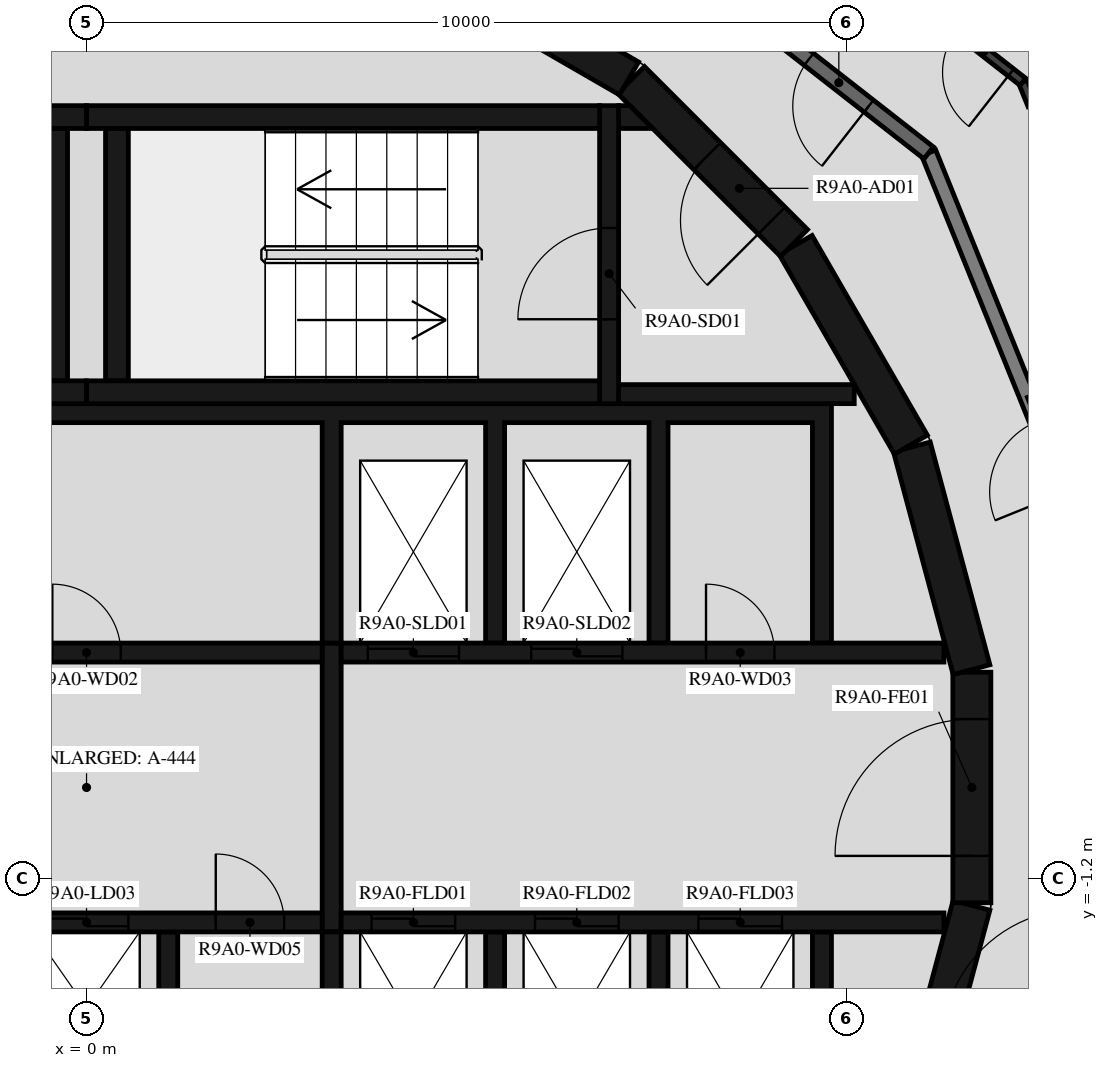
"""IFC4 building model, lengths in metres.
Left out: names, types, materials, properties, quantities, classifications, styles, units other than length and angle.
Written with IfcOpenShell. Run it as: python <this file> out.ifc"""

import sys

from ifc_helpers import new_model, si_unit, direction, frame, frame_2d, origin, place, context, subcontext, project, spatial, polyline, rectangle, outline, extrude, element, fill, save


model = new_model("IFC4")
c1 = context("Model", 3, precision=1e-05, world=origin(), true_north=direction((0.0, 1.0)))
c2 = subcontext(c1, "Body", "Model", "MODEL_VIEW")
j1 = project(units=[si_unit("LENGTHUNIT", "METRE"), si_unit("PLANEANGLEUNIT", "RADIAN")], contexts=[c1])
p1 = place(None, origin())
s1 = spatial("IfcSite", under=j1, at=p1, CompositionType="ELEMENT")
p2 = place(p1, origin())
s2 = spatial("IfcBuilding", under=s1, at=p2, CompositionType="ELEMENT")
p3 = place(p2, frame((0.0, 0.0, 333.0)))
s3 = spatial("IfcBuildingStorey", under=s2, at=p3, CompositionType="ELEMENT", Elevation=333.0)
p4 = place(p3, frame((10.858, -4.479, 0.0), z_axis=(0.0, 0.0, 1.0), x_axis=(0.258734743916, 0.965948410781, 0.0)))
e1 = element("IfcWall", 1, at=p4, inside=s3, PredefinedType="SHEAR", context=c2, shape_type="SweptSolid", body=[
    extrude(rectangle(XDim=3.033, YDim=0.5, at=frame_2d((1.516, 0.0))), origin(), (0.0, 0.0, 1.0), 3.12),
])
p5 = place(p3, frame((11.647, -1.516, 0.0), z_axis=(0.0, 0.0, 1.0), x_axis=(0.0, 1.0, 0.0)))
e2 = element("IfcWall", 2, at=p5, inside=s3, PredefinedType="SHEAR", context=c2, shape_type="SweptSolid", body=[
    extrude(rectangle(XDim=3.033, YDim=0.5, at=frame_2d((1.516, 0.0))), origin(), (0.0, 0.0, 1.0), 3.12),
])
p6 = place(p5, frame((0.616, 0.0, 0.0)))
e3 = element("IfcOpeningElement", 3, at=p6, cuts=e2, PredefinedType="OPENING", context=c2, shape_type="SweptSolid", body=[
    extrude(rectangle(XDim=1.8, YDim=2.1, at=frame_2d((0.9, 1.05))), frame((0.0, 0.26, 0.0), z_axis=(0.0, -1.0, 0.0), x_axis=(1.0, 0.0, 0.0)), (0.0, 0.0, 1.0), 0.52),
])
for number, where, z_axis, x_axis in (
    (4, (11.643, 1.55, 0.0), (0.0, 0.0, 1.0), (-0.259, 0.966, 0.0)),
    (5, (10.845, 4.51, 0.0), (0.0, 0.0, 1.0), (-0.5, 0.866, 0.0)),
):
    element("IfcWall", number, at=place(p3, frame(where, z_axis=z_axis, x_axis=x_axis)), inside=s3, PredefinedType="SHEAR", context=c2, shape_type="SweptSolid", body=[
        extrude(rectangle(XDim=3.033, YDim=0.5, at=frame_2d((1.516, 0.0))), origin(), (0.0, 0.0, 1.0), 3.12),
    ])
p7 = place(p3, frame((9.308, 7.164, 0.0), z_axis=(0.0, 0.0, 1.0), x_axis=(-0.707106781187, 0.707106781187, 0.0)))
e6 = element("IfcWall", 6, at=p7, inside=s3, PredefinedType="SHEAR", context=c2, shape_type="SweptSolid", body=[
    extrude(rectangle(XDim=3.032, YDim=0.5, at=frame_2d((1.516, 0.0))), origin(), (0.0, 0.0, 1.0), 3.12),
])
p8 = place(p7, frame((0.416, 0.0, 0.0)))
e7 = element("IfcOpeningElement", 7, at=p8, cuts=e6, PredefinedType="OPENING", context=c2, shape_type="SweptSolid", body=[
    extrude(rectangle(XDim=1.2, YDim=2.1, at=frame_2d((0.6, 1.05))), frame((0.0, 0.26, 0.0), z_axis=(0.0, -1.0, 0.0), x_axis=(1.0, 0.0, 0.0)), (0.0, 0.0, 1.0), 0.52),
])
p9 = place(p3, frame((7.137, 9.329, 0.0), z_axis=(0.0, 0.0, 1.0), x_axis=(-0.865975092491, 0.500087131594, 0.0)))
e8 = element("IfcWall", 8, at=p9, inside=s3, PredefinedType="SHEAR", context=c2, shape_type="SweptSolid", body=[
    extrude(rectangle(XDim=3.033, YDim=0.5, at=frame_2d((1.516, 0.0))), origin(), (0.0, 0.0, 1.0), 3.12),
])
for number, where, z_axis, x_axis in (
    (9, (0.0, 5.2, 0.0), (0.0, 0.0, 1.0), (1.0, 0.0, 0.0)),
    (10, (0.0, 8.82, 0.0), (0.0, 0.0, 1.0), (1.0, 0.0, 0.0)),
):
    element("IfcWall", number, at=place(p3, frame(where, z_axis=z_axis, x_axis=x_axis)), inside=s3, PredefinedType="SHEAR", context=c2, shape_type="SweptSolid", body=[
        extrude(rectangle(XDim=6.75, YDim=0.3, at=frame_2d((3.375, 0.0))), origin(), (0.0, 0.0, 1.0), 3.12),
    ])
p10 = place(p3, frame((0.4, 5.35, 0.0), z_axis=(0.0, 0.0, 1.0), x_axis=(0.0, 1.0, 0.0)))
e11 = element("IfcWall", 11, at=p10, inside=s3, PredefinedType="SHEAR", context=c2, shape_type="SweptSolid", body=[
    extrude(rectangle(XDim=3.32, YDim=0.3, at=frame_2d((1.66, 0.0))), origin(), (0.0, 0.0, 1.0), 3.12),
])
p11 = place(p3, frame((6.875, 5.05, 0.0), z_axis=(0.0, 0.0, 1.0), x_axis=(0.0, 1.0, 0.0)))
e12 = element("IfcWall", 12, at=p11, inside=s3, PredefinedType="SHEAR", context=c2, shape_type="SweptSolid", body=[
    extrude(rectangle(XDim=3.92, YDim=0.25, at=frame_2d((1.96, 0.0))), origin(), (0.0, 0.0, 1.0), 3.12),
])
p12 = place(p11, frame((1.11, 0.0, 0.0)))
e13 = element("IfcOpeningElement", 13, at=p12, cuts=e12, PredefinedType="OPENING", context=c2, shape_type="SweptSolid", body=[
    extrude(rectangle(XDim=1.2, YDim=2.1, at=frame_2d((0.6, 1.05))), frame((0.0, 0.135, 0.0), z_axis=(0.0, -1.0, 0.0), x_axis=(1.0, 0.0, 0.0)), (0.0, 0.0, 1.0), 0.27),
])
p13 = place(p3, frame((7.0, 5.175, 0.0), z_axis=(0.0, 0.0, 1.0), x_axis=(1.0, 0.0, 0.0)))
e14 = element("IfcWall", 14, at=p13, inside=s3, PredefinedType="SHEAR", context=c2, shape_type="SweptSolid", body=[
    extrude(rectangle(XDim=3.1, YDim=0.25, at=frame_2d((1.55, 0.0))), origin(), (0.0, 0.0, 1.0), 3.12),
])
p14 = place(p3, origin())
e15 = element("IfcWall", 15, at=p14, inside=s3, PredefinedType="SHEAR", context=c2, shape_type="SweptSolid", body=[
    extrude(outline(polyline([(7.448, 8.67), (7.0, 8.67), (7.0, 8.97), (7.148, 8.97), (7.448, 8.67)])), origin(), (0.0, 0.0, 1.0), 3.12),
])
for number, where, z_axis, x_axis in (
    (16, (-6.75, 5.2, 0.0), (0.0, 0.0, 1.0), (1.0, 0.0, 0.0)),
    (17, (-6.75, 8.82, 0.0), (0.0, 0.0, 1.0), (1.0, 0.0, 0.0)),
):
    element("IfcWall", number, at=place(p3, frame(where, z_axis=z_axis, x_axis=x_axis)), inside=s3, PredefinedType="SHEAR", context=c2, shape_type="SweptSolid", body=[
        extrude(rectangle(XDim=6.75, YDim=0.3, at=frame_2d((3.375, 0.0))), origin(), (0.0, 0.0, 1.0), 3.12),
    ])
p15 = place(p3, frame((-0.4, 5.35, 0.0), z_axis=(0.0, 0.0, 1.0), x_axis=(0.0, 1.0, 0.0)))
e18 = element("IfcWall", 18, at=p15, inside=s3, PredefinedType="SHEAR", context=c2, shape_type="SweptSolid", body=[
    extrude(rectangle(XDim=3.32, YDim=0.3, at=frame_2d((1.66, 0.0))), origin(), (0.0, 0.0, 1.0), 3.12),
])
p16 = place(p3, origin())
e19 = element("IfcWall", 19, at=p16, inside=s3, PredefinedType="SHEAR", context=c2, shape_type="SweptSolid", body=[
    extrude(outline(polyline([(-9.8, 1.9), (-9.55, 1.9), (-9.55, 4.8), (-3.35, 4.8), (-3.35, 1.9), (-3.1, 1.9), (-3.1, 4.8), (3.1, 4.8), (3.1, 1.9), (3.35, 1.9), (3.35, 4.8), (5.25, 4.8), (5.25, 1.9), (5.5, 1.9), (5.5, 4.8), (7.4, 4.8), (7.4, 1.9), (7.65, 1.9), (7.65, 4.8), (9.55, 4.8), (9.55, 1.9), (9.8, 1.9), (9.8, 4.8), (9.8, 5.05), (-9.8, 5.05), (-9.8, 4.8), (-9.8, 1.9)])), origin(), (0.0, 0.0, 1.0), 3.12),
])
p17 = place(p3, origin())
e20 = element("IfcWall", 20, at=p17, inside=s3, PredefinedType="SHEAR", context=c2, shape_type="SweptSolid", body=[
    extrude(outline(polyline([(9.8, -5.05), (9.8, -4.8), (9.8, -1.9), (9.55, -1.9), (9.55, -4.8), (7.65, -4.8), (7.65, -1.9), (7.4, -1.9), (7.4, -4.8), (5.5, -4.8), (5.5, -1.9), (5.25, -1.9), (5.25, -4.8), (3.35, -4.8), (3.35, -1.9), (3.1, -1.9), (3.1, -4.8), (1.2, -4.8), (1.2, -1.9), (0.95, -1.9), (0.95, -4.8), (-0.95, -4.8), (-0.95, -1.9), (-1.2, -1.9), (-1.2, -4.8), (-3.1, -4.8), (-3.1, -1.9), (-3.35, -1.9), (-3.35, -4.8), (-5.25, -4.8), (-5.25, -1.9), (-5.5, -1.9), (-5.5, -4.8), (-9.55, -4.8), (-9.55, -1.9), (-9.8, -1.9), (-9.8, -4.8), (-9.8, -5.05), (9.8, -5.05)])), origin(), (0.0, 0.0, 1.0), 3.12),
])
p18 = place(p3, frame((-11.28, 1.775, 0.0), z_axis=(0.0, 0.0, 1.0), x_axis=(1.0, 0.0, 0.0)))
e21 = element("IfcWall", 21, at=p18, inside=s3, PredefinedType="SHEAR", context=c2, shape_type="SweptSolid", body=[
    extrude(rectangle(XDim=14.38, YDim=0.25, at=frame_2d((7.19, 0.0))), origin(), (0.0, 0.0, 1.0), 3.12),
])
p19 = place(p18, frame((4.38, 0.0, 0.0)))
e22 = element("IfcOpeningElement", 22, at=p19, cuts=e21, PredefinedType="OPENING", context=c2, shape_type="SweptSolid", body=[
    extrude(rectangle(XDim=0.9, YDim=2.1, at=frame_2d((0.45, 1.05))), frame((0.0, 0.135, 0.0), z_axis=(0.0, -1.0, 0.0), x_axis=(1.0, 0.0, 0.0)), (0.0, 0.0, 1.0), 0.27),
])
p20 = place(p18, frame((10.83, 0.0, 0.0)))
e23 = element("IfcOpeningElement", 23, at=p20, cuts=e21, PredefinedType="OPENING", context=c2, shape_type="SweptSolid", body=[
    extrude(rectangle(XDim=0.9, YDim=2.1, at=frame_2d((0.45, 1.05))), frame((0.0, 0.135, 0.0), z_axis=(0.0, -1.0, 0.0), x_axis=(1.0, 0.0, 0.0)), (0.0, 0.0, 1.0), 0.27),
])
p21 = place(p3, frame((3.35, 1.775, 0.0), z_axis=(0.0, 0.0, 1.0), x_axis=(1.0, 0.0, 0.0)))
e24 = element("IfcWall", 24, at=p21, inside=s3, PredefinedType="SHEAR", context=c2, shape_type="SweptSolid", body=[
    extrude(rectangle(XDim=7.93, YDim=0.25, at=frame_2d((3.965, 0.0))), origin(), (0.0, 0.0, 1.0), 3.12),
])
p22 = place(p21, frame((0.35, 0.0, 0.0)))
e25 = element("IfcOpeningElement", 25, at=p22, cuts=e24, PredefinedType="OPENING", context=c2, shape_type="SweptSolid", body=[
    extrude(rectangle(XDim=1.2, YDim=2.4, at=frame_2d((0.6, 1.2))), frame((0.0, 0.135, 0.0), z_axis=(0.0, -1.0, 0.0), x_axis=(1.0, 0.0, 0.0)), (0.0, 0.0, 1.0), 0.27),
])
p23 = place(p21, frame((2.5, 0.0, 0.0)))
e26 = element("IfcOpeningElement", 26, at=p23, cuts=e24, PredefinedType="OPENING", context=c2, shape_type="SweptSolid", body=[
    extrude(rectangle(XDim=1.2, YDim=2.4, at=frame_2d((0.6, 1.2))), frame((0.0, 0.135, 0.0), z_axis=(0.0, -1.0, 0.0), x_axis=(1.0, 0.0, 0.0)), (0.0, 0.0, 1.0), 0.27),
])
p24 = place(p21, frame((4.8, 0.0, 0.0)))
e27 = element("IfcOpeningElement", 27, at=p24, cuts=e24, PredefinedType="OPENING", context=c2, shape_type="SweptSolid", body=[
    extrude(rectangle(XDim=0.9, YDim=2.1, at=frame_2d((0.45, 1.05))), frame((0.0, 0.135, 0.0), z_axis=(0.0, -1.0, 0.0), x_axis=(1.0, 0.0, 0.0)), (0.0, 0.0, 1.0), 0.27),
])
p25 = place(p3, frame((-11.28, -1.775, 0.0), z_axis=(0.0, 0.0, 1.0), x_axis=(1.0, 0.0, 0.0)))
e28 = element("IfcWall", 28, at=p25, inside=s3, PredefinedType="SHEAR", context=c2, shape_type="SweptSolid", body=[
    extrude(rectangle(XDim=14.38, YDim=0.25, at=frame_2d((7.19, 0.0))), origin(), (0.0, 0.0, 1.0), 3.12),
])
p26 = place(p25, frame((6.43, 0.0, 0.0)))
e29 = element("IfcOpeningElement", 29, at=p26, cuts=e28, PredefinedType="OPENING", context=c2, shape_type="SweptSolid", body=[
    extrude(rectangle(XDim=1.1, YDim=2.1, at=frame_2d((0.55, 1.05))), frame((0.0, 0.135, 0.0), z_axis=(0.0, -1.0, 0.0), x_axis=(1.0, 0.0, 0.0)), (0.0, 0.0, 1.0), 0.27),
])
p27 = place(p25, frame((8.58, 0.0, 0.0)))
e30 = element("IfcOpeningElement", 30, at=p27, cuts=e28, PredefinedType="OPENING", context=c2, shape_type="SweptSolid", body=[
    extrude(rectangle(XDim=1.1, YDim=2.1, at=frame_2d((0.55, 1.05))), frame((0.0, 0.135, 0.0), z_axis=(0.0, -1.0, 0.0), x_axis=(1.0, 0.0, 0.0)), (0.0, 0.0, 1.0), 0.27),
])
p28 = place(p25, frame((10.73, 0.0, 0.0)))
e31 = element("IfcOpeningElement", 31, at=p28, cuts=e28, PredefinedType="OPENING", context=c2, shape_type="SweptSolid", body=[
    extrude(rectangle(XDim=1.1, YDim=2.1, at=frame_2d((0.55, 1.05))), frame((0.0, 0.135, 0.0), z_axis=(0.0, -1.0, 0.0), x_axis=(1.0, 0.0, 0.0)), (0.0, 0.0, 1.0), 0.27),
])
p29 = place(p25, frame((3.305, 0.0, 0.0)))
e32 = element("IfcOpeningElement", 32, at=p29, cuts=e28, PredefinedType="OPENING", context=c2, shape_type="SweptSolid", body=[
    extrude(rectangle(XDim=0.9, YDim=2.1, at=frame_2d((0.45, 1.05))), frame((0.0, 0.135, 0.0), z_axis=(0.0, -1.0, 0.0), x_axis=(1.0, 0.0, 0.0)), (0.0, 0.0, 1.0), 0.27),
])
p30 = place(p25, frame((12.98, 0.0, 0.0)))
e33 = element("IfcOpeningElement", 33, at=p30, cuts=e28, PredefinedType="OPENING", context=c2, shape_type="SweptSolid", body=[
    extrude(rectangle(XDim=0.9, YDim=2.1, at=frame_2d((0.45, 1.05))), frame((0.0, 0.135, 0.0), z_axis=(0.0, -1.0, 0.0), x_axis=(1.0, 0.0, 0.0)), (0.0, 0.0, 1.0), 0.27),
])
p31 = place(p3, frame((3.35, -1.775, 0.0), z_axis=(0.0, 0.0, 1.0), x_axis=(1.0, 0.0, 0.0)))
e34 = element("IfcWall", 34, at=p31, inside=s3, PredefinedType="SHEAR", context=c2, shape_type="SweptSolid", body=[
    extrude(rectangle(XDim=7.93, YDim=0.25, at=frame_2d((3.965, 0.0))), origin(), (0.0, 0.0, 1.0), 3.12),
])
p32 = place(p31, frame((0.4, 0.0, 0.0)))
e35 = element("IfcOpeningElement", 35, at=p32, cuts=e34, PredefinedType="OPENING", context=c2, shape_type="SweptSolid", body=[
    extrude(rectangle(XDim=1.1, YDim=2.4, at=frame_2d((0.55, 1.2))), frame((0.0, 0.135, 0.0), z_axis=(0.0, -1.0, 0.0), x_axis=(1.0, 0.0, 0.0)), (0.0, 0.0, 1.0), 0.27),
])
p33 = place(p31, frame((2.55, 0.0, 0.0)))
e36 = element("IfcOpeningElement", 36, at=p33, cuts=e34, PredefinedType="OPENING", context=c2, shape_type="SweptSolid", body=[
    extrude(rectangle(XDim=1.1, YDim=2.4, at=frame_2d((0.55, 1.2))), frame((0.0, 0.135, 0.0), z_axis=(0.0, -1.0, 0.0), x_axis=(1.0, 0.0, 0.0)), (0.0, 0.0, 1.0), 0.27),
])
p34 = place(p31, frame((4.7, 0.0, 0.0)))
e37 = element("IfcOpeningElement", 37, at=p34, cuts=e34, PredefinedType="OPENING", context=c2, shape_type="SweptSolid", body=[
    extrude(rectangle(XDim=1.1, YDim=2.4, at=frame_2d((0.55, 1.2))), frame((0.0, 0.135, 0.0), z_axis=(0.0, -1.0, 0.0), x_axis=(1.0, 0.0, 0.0)), (0.0, 0.0, 1.0), 0.27),
])
p35 = place(p3, frame((3.225, -1.9, 0.0), z_axis=(0.0, 0.0, 1.0), x_axis=(0.0, 1.0, 0.0)))
e38 = element("IfcWall", 38, at=p35, inside=s3, PredefinedType="SHEAR", context=c2, shape_type="SweptSolid", body=[
    extrude(rectangle(XDim=3.8, YDim=0.25, at=frame_2d((1.9, 0.0))), origin(), (0.0, 0.0, 1.0), 3.12),
])
p36 = place(p3, frame((13.769, 1.691, 0.0), z_axis=(0.0, 0.0, 1.0), x_axis=(-0.374618189599, 0.92717916932, 0.0)))
e39 = element("IfcWall", 39, at=p36, inside=s3, PredefinedType="STANDARD", context=c2, shape_type="SweptSolid", body=[
    extrude(rectangle(XDim=7.181, YDim=0.2, at=frame_2d((3.591, 0.0))), origin(), (0.0, 0.0, 1.0), 3.12),
])
p37 = place(p36, frame((2.371, 0.0, 0.0)))
e40 = element("IfcOpeningElement", 40, at=p37, cuts=e39, PredefinedType="OPENING", context=c2, shape_type="SweptSolid", body=[
    extrude(rectangle(XDim=1.0, YDim=2.1, at=frame_2d((0.5, 1.05))), frame((0.0, 0.11, 0.0), z_axis=(0.0, -1.0, 0.0), x_axis=(1.0, 0.0, 0.0)), (0.0, 0.0, 1.0), 0.22),
])
p38 = place(p3, frame((11.079, 8.349, 0.0), z_axis=(0.0, 0.0, 1.0), x_axis=(-0.78800478687, 0.615669112324, 0.0)))
e41 = element("IfcWall", 41, at=p38, inside=s3, PredefinedType="STANDARD", context=c2, shape_type="SweptSolid", body=[
    extrude(rectangle(XDim=7.181, YDim=0.2, at=frame_2d((3.591, 0.0))), origin(), (0.0, 0.0, 1.0), 3.12),
])
p39 = place(p38, frame((1.0, 0.0, 0.0)))
e42 = element("IfcOpeningElement", 42, at=p39, cuts=e41, PredefinedType="OPENING", context=c2, shape_type="SweptSolid", body=[
    extrude(rectangle(XDim=1.0, YDim=2.1, at=frame_2d((0.5, 1.05))), frame((0.0, 0.11, 0.0), z_axis=(0.0, -1.0, 0.0), x_axis=(1.0, 0.0, 0.0)), (0.0, 0.0, 1.0), 0.22),
])
p40 = place(p3, frame((13.807, 5.601, 0.0), z_axis=(0.0, 0.0, 1.0), x_axis=(-0.927202702405, -0.374559939999, 0.0)))
e43 = element("IfcWall", 43, at=p40, inside=s3, PredefinedType="STANDARD", context=c2, shape_type="SweptSolid", body=[
    extrude(rectangle(XDim=1.5, YDim=0.2, at=frame_2d((0.75, 0.0))), origin(), (0.0, 0.0, 1.0), 3.12),
])
p41 = place(p3, frame((12.442, 8.979, 0.0), z_axis=(0.0, 0.0, 1.0), x_axis=(-0.374979656603, 0.927033039936, 0.0)))
e44 = element("IfcWall", 44, at=p41, inside=s3, PredefinedType="PARTITIONING", context=c2, shape_type="SweptSolid", body=[
    extrude(rectangle(XDim=0.328, YDim=0.12, at=frame_2d((0.164, 0.0))), origin(), (0.0, 0.0, 1.0), 3.12),
])
p42 = place(p3, frame((12.319, 9.283, 0.0), z_axis=(0.0, 0.0, 1.0), x_axis=(-0.788000268464, 0.61567489546, 0.0)))
e45 = element("IfcWall", 45, at=p42, inside=s3, PredefinedType="PARTITIONING", context=c2, shape_type="SweptSolid", body=[
    extrude(rectangle(XDim=7.985, YDim=0.12, at=frame_2d((3.992, 0.0))), origin(), (0.0, 0.0, 1.0), 3.12),
])
p43 = place(p42, frame((0.2, 0.0, 0.0)))
e46 = element("IfcOpeningElement", 46, at=p43, cuts=e45, PredefinedType="OPENING", context=c2, shape_type="SweptSolid", body=[
    extrude(rectangle(XDim=0.9, YDim=2.1, at=frame_2d((0.45, 1.05))), frame((0.0, 0.07, 0.0), z_axis=(0.0, -1.0, 0.0), x_axis=(1.0, 0.0, 0.0)), (0.0, 0.0, 1.0), 0.14),
])
p44 = place(p12, origin())
e47 = element("IfcDoor", 47, at=p44, inside=s3, OperationType="SINGLE_SWING_LEFT", PredefinedType="DOOR", context=c2, shape_type="SweptSolid", body=[
    extrude(rectangle(XDim=1.2, YDim=2.1, at=frame_2d((0.6, 1.05))), frame((0.0, 0.025, 0.0), z_axis=(0.0, -1.0, 0.0), x_axis=(1.0, 0.0, 0.0)), (0.0, 0.0, 1.0), 0.05),
])
fill(e13, e47)
p45 = place(p8, origin())
e48 = element("IfcDoor", 48, at=p45, inside=s3, OperationType="SINGLE_SWING_RIGHT", PredefinedType="DOOR", context=c2, shape_type="SweptSolid", body=[
    extrude(rectangle(XDim=1.2, YDim=2.1, at=frame_2d((0.6, 1.05))), frame((0.0, 0.025, 0.0), z_axis=(0.0, -1.0, 0.0), x_axis=(1.0, 0.0, 0.0)), (0.0, 0.0, 1.0), 0.05),
])
fill(e7, e48)
p46 = place(p6, origin())
e49 = element("IfcDoor", 49, at=p46, inside=s3, OperationType="DOUBLE_DOOR_SINGLE_SWING", PredefinedType="DOOR", context=c2, shape_type="SweptSolid", body=[
    extrude(rectangle(XDim=1.8, YDim=2.1, at=frame_2d((0.9, 1.05))), frame((0.0, 0.025, 0.0), z_axis=(0.0, -1.0, 0.0), x_axis=(1.0, 0.0, 0.0)), (0.0, 0.0, 1.0), 0.05),
])
fill(e3, e49)
p47 = place(p22, origin())
e50 = element("IfcDoor", 50, at=p47, inside=s3, OperationType="DOUBLE_DOOR_SLIDING", PredefinedType="DOOR", context=c2, shape_type="SweptSolid", body=[
    extrude(rectangle(XDim=1.2, YDim=2.4, at=frame_2d((0.6, 1.2))), frame((0.0, 0.025, 0.0), z_axis=(0.0, -1.0, 0.0), x_axis=(1.0, 0.0, 0.0)), (0.0, 0.0, 1.0), 0.05),
])
fill(e25, e50)
p48 = place(p23, origin())
e51 = element("IfcDoor", 51, at=p48, inside=s3, OperationType="DOUBLE_DOOR_SLIDING", PredefinedType="DOOR", context=c2, shape_type="SweptSolid", body=[
    extrude(rectangle(XDim=1.2, YDim=2.4, at=frame_2d((0.6, 1.2))), frame((0.0, 0.025, 0.0), z_axis=(0.0, -1.0, 0.0), x_axis=(1.0, 0.0, 0.0)), (0.0, 0.0, 1.0), 0.05),
])
fill(e26, e51)
p49 = place(p28, origin())
e52 = element("IfcDoor", 52, at=p49, inside=s3, OperationType="DOUBLE_DOOR_SLIDING", PredefinedType="DOOR", context=c2, shape_type="SweptSolid", body=[
    extrude(rectangle(XDim=1.1, YDim=2.1, at=frame_2d((0.55, 1.05))), frame((0.0, 0.025, 0.0), z_axis=(0.0, -1.0, 0.0), x_axis=(1.0, 0.0, 0.0)), (0.0, 0.0, 1.0), 0.05),
])
fill(e31, e52)
p50 = place(p32, origin())
e53 = element("IfcDoor", 53, at=p50, inside=s3, OperationType="DOUBLE_DOOR_SLIDING", PredefinedType="DOOR", context=c2, shape_type="SweptSolid", body=[
    extrude(rectangle(XDim=1.1, YDim=2.4, at=frame_2d((0.55, 1.2))), frame((0.0, 0.025, 0.0), z_axis=(0.0, -1.0, 0.0), x_axis=(1.0, 0.0, 0.0)), (0.0, 0.0, 1.0), 0.05),
])
fill(e35, e53)
p51 = place(p33, origin())
e54 = element("IfcDoor", 54, at=p51, inside=s3, OperationType="DOUBLE_DOOR_SLIDING", PredefinedType="DOOR", context=c2, shape_type="SweptSolid", body=[
    extrude(rectangle(XDim=1.1, YDim=2.4, at=frame_2d((0.55, 1.2))), frame((0.0, 0.025, 0.0), z_axis=(0.0, -1.0, 0.0), x_axis=(1.0, 0.0, 0.0)), (0.0, 0.0, 1.0), 0.05),
])
fill(e36, e54)
p52 = place(p34, origin())
e55 = element("IfcDoor", 55, at=p52, inside=s3, OperationType="DOUBLE_DOOR_SLIDING", PredefinedType="DOOR", context=c2, shape_type="SweptSolid", body=[
    extrude(rectangle(XDim=1.1, YDim=2.4, at=frame_2d((0.55, 1.2))), frame((0.0, 0.025, 0.0), z_axis=(0.0, -1.0, 0.0), x_axis=(1.0, 0.0, 0.0)), (0.0, 0.0, 1.0), 0.05),
])
fill(e37, e55)
p53 = place(p20, origin())
e56 = element("IfcDoor", 56, at=p53, inside=s3, OperationType="SINGLE_SWING_RIGHT", PredefinedType="DOOR", context=c2, shape_type="SweptSolid", body=[
    extrude(rectangle(XDim=0.9, YDim=2.1, at=frame_2d((0.45, 1.05))), frame((0.0, 0.025, 0.0), z_axis=(0.0, -1.0, 0.0), x_axis=(1.0, 0.0, 0.0)), (0.0, 0.0, 1.0), 0.05),
])
fill(e23, e56)
p54 = place(p24, origin())
e57 = element("IfcDoor", 57, at=p54, inside=s3, OperationType="SINGLE_SWING_LEFT", PredefinedType="DOOR", context=c2, shape_type="SweptSolid", body=[
    extrude(rectangle(XDim=0.9, YDim=2.1, at=frame_2d((0.45, 1.05))), frame((0.0, 0.025, 0.0), z_axis=(0.0, -1.0, 0.0), x_axis=(1.0, 0.0, 0.0)), (0.0, 0.0, 1.0), 0.05),
])
fill(e27, e57)
p55 = place(p30, origin())
e58 = element("IfcDoor", 58, at=p55, inside=s3, OperationType="SINGLE_SWING_LEFT", PredefinedType="DOOR", context=c2, shape_type="SweptSolid", body=[
    extrude(rectangle(XDim=0.9, YDim=2.1, at=frame_2d((0.45, 1.05))), frame((0.0, 0.025, 0.0), z_axis=(0.0, -1.0, 0.0), x_axis=(1.0, 0.0, 0.0)), (0.0, 0.0, 1.0), 0.05),
])
fill(e33, e58)
p56 = place(p39, origin())
e59 = element("IfcDoor", 59, at=p56, inside=s3, OperationType="SINGLE_SWING_LEFT", PredefinedType="DOOR", context=c2, shape_type="SweptSolid", body=[
    extrude(rectangle(XDim=1.0, YDim=2.1, at=frame_2d((0.5, 1.05))), frame((0.0, 0.025, 0.0), z_axis=(0.0, -1.0, 0.0), x_axis=(1.0, 0.0, 0.0)), (0.0, 0.0, 1.0), 0.05),
])
fill(e42, e59)
p57 = place(p43, origin())
e60 = element("IfcDoor", 60, at=p57, inside=s3, OperationType="SINGLE_SWING_LEFT", PredefinedType="DOOR", context=c2, shape_type="SweptSolid", body=[
    extrude(rectangle(XDim=0.9, YDim=2.1, at=frame_2d((0.45, 1.05))), frame((0.0, 0.025, 0.0), z_axis=(0.0, -1.0, 0.0), x_axis=(1.0, 0.0, 0.0)), (0.0, 0.0, 1.0), 0.05),
])
fill(e46, e60)
save(model, sys.argv[1])
